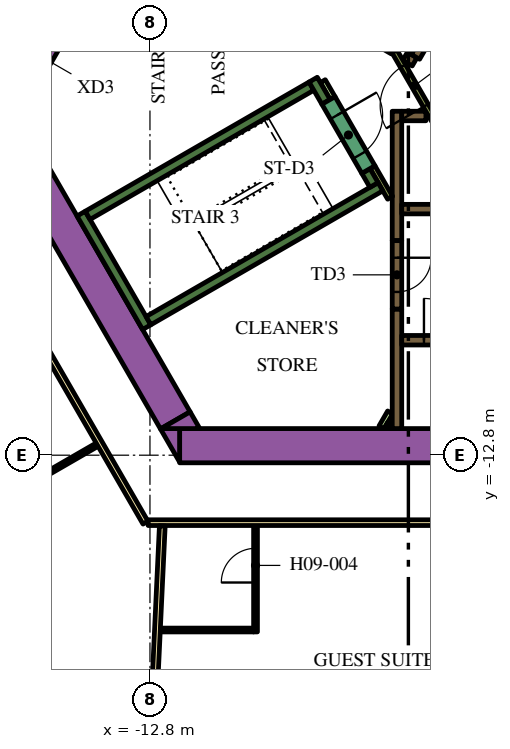
"""IFC4 building model, lengths in metres.
Left out: names, types, materials, properties, quantities, classifications, styles, units other than length and angle.
Written with IfcOpenShell. Run it as: python <this file> out.ifc"""

import sys

from ifc_helpers import new_model, si_unit, direction, frame, frame_2d, origin, place, context, subcontext, project, spatial, polyline, rectangle, outline, extrude, element, fill, save


model = new_model("IFC4")
c1 = context("Model", 3, precision=1e-05, world=origin(), true_north=direction((0.0, 1.0)))
c2 = subcontext(c1, "Body", "Model", "MODEL_VIEW")
j1 = project(units=[si_unit("LENGTHUNIT", "METRE"), si_unit("PLANEANGLEUNIT", "RADIAN")], contexts=[c1])
p1 = place(None, origin())
s1 = spatial("IfcSite", under=j1, at=p1, CompositionType="ELEMENT")
p2 = place(p1, origin())
s2 = spatial("IfcBuilding", under=s1, at=p2, CompositionType="ELEMENT")
p3 = place(p2, frame((0.0, 0.0, 122.7)))
s3 = spatial("IfcBuildingStorey", under=s2, at=p3, CompositionType="ELEMENT", Elevation=122.7)
p4 = place(p3, frame((-12.019, -12.55, 0.0), z_axis=(0.0, 0.0, 1.0), x_axis=(1.0, 0.0, 0.0)))
e1 = element("IfcWall", 1, at=p4, inside=s3, PredefinedType="SOLIDWALL", context=c2, shape_type="SweptSolid", body=[
    extrude(rectangle(XDim=22.083, YDim=0.9, at=frame_2d((11.042, 0.0))), origin(), (0.0, 0.0, 1.0), 3.9),
])
p5 = place(p3, origin())
e2 = element("IfcWall", 2, at=p5, inside=s3, PredefinedType="SOLIDWALL", context=c2, shape_type="SweptSolid", body=[
    extrude(outline(polyline([(-12.529, -12.1), (-12.021, -12.1), (-12.021, -12.98), (-12.529, -12.1)])), origin(), (0.0, 0.0, 1.0), 3.9),
])
p6 = place(p3, frame((-12.134, -11.883, 0.0), z_axis=(0.0, 0.0, 1.0), x_axis=(-0.500005339912, 0.866022320763, 0.0)))
e3 = element("IfcWall", 3, at=p6, inside=s3, PredefinedType="SOLIDWALL", context=c2, shape_type="SweptSolid", body=[
    extrude(rectangle(XDim=9.488, YDim=0.9, at=frame_2d((4.744, 0.0))), origin(), (0.0, 0.0, 1.0), 3.9),
])
e4 = element("IfcWall", 4, at=p5, inside=s3, PredefinedType="SOLIDWALL", context=c2, shape_type="SweptSolid", body=[
    extrude(outline(polyline([(-11.489, -12.1), (-12.505, -12.1), (-11.743, -11.66), (-11.489, -12.1)])), origin(), (0.0, 0.0, 1.0), 3.9),
])
p7 = place(p3, frame((-12.885, -9.431, 0.0), z_axis=(0.0, 0.0, 1.0), x_axis=(-0.500020560727, 0.866013532718, 0.0)))
e5 = element("IfcWall", 5, at=p7, inside=s3, PredefinedType="SOLIDWALL", context=c2, shape_type="SweptSolid", body=[
    extrude(rectangle(XDim=3.45, YDim=0.25, at=frame_2d((1.725, 0.0))), origin(), (0.0, 0.0, 1.0), 3.9),
])
p8 = place(p3, frame((-14.44, -6.49, 0.0), z_axis=(0.0, 0.0, 1.0), x_axis=(0.866022966069, 0.500004222222, 0.0)))
e6 = element("IfcWall", 6, at=p8, inside=s3, PredefinedType="SOLIDWALL", context=c2, shape_type="SweptSolid", body=[
    extrude(rectangle(XDim=6.8, YDim=0.25, at=frame_2d((3.4, 0.0))), origin(), (0.0, 0.0, 1.0), 3.9),
])
p9 = place(p3, frame((-8.168, -3.503, 0.0), z_axis=(0.0, 0.0, 1.0), x_axis=(-0.499952099219, 0.866053057547, 0.0)))
e7 = element("IfcWall", 7, at=p9, inside=s3, PredefinedType="SOLIDWALL", context=c2, shape_type="SweptSolid", body=[
    extrude(rectangle(XDim=0.675, YDim=0.25, at=frame_2d((0.337, 0.0))), origin(), (0.0, 0.0, 1.0), 3.9),
])
p10 = place(p3, frame((-12.84, -9.261, 0.0), z_axis=(0.0, 0.0, 1.0), x_axis=(0.866016039709, 0.500016218704, 0.0)))
e8 = element("IfcWall", 8, at=p10, inside=s3, PredefinedType="SOLIDWALL", context=c2, shape_type="SweptSolid", body=[
    extrude(rectangle(XDim=7.05, YDim=0.25, at=frame_2d((3.525, 0.0))), origin(), (0.0, 0.0, 1.0), 3.9),
])
p11 = place(p3, frame((-6.905, -5.69, 0.0), z_axis=(0.0, 0.0, 1.0), x_axis=(-0.500402024738, 0.865793170242, 0.0)))
e9 = element("IfcWall", 9, at=p11, inside=s3, PredefinedType="SOLIDWALL", context=c2, shape_type="SweptSolid", body=[
    extrude(rectangle(XDim=0.425, YDim=0.25, at=frame_2d((0.212, 0.0))), origin(), (0.0, 0.0, 1.0), 3.9),
])
p12 = place(p3, frame((-6.3, -12.1, 0.0), z_axis=(0.0, 0.0, 1.0), x_axis=(0.0, 1.0, 0.0)))
e10 = element("IfcWall", 10, at=p12, inside=s3, PredefinedType="SOLIDWALL", context=c2, shape_type="SweptSolid", body=[
    extrude(rectangle(XDim=3.146, YDim=0.25, at=frame_2d((1.573, 0.0))), origin(), (0.0, 0.0, 1.0), 3.9),
])
p13 = place(p3, frame((-6.3, -3.75, 0.0), z_axis=(0.0, 0.0, 1.0), x_axis=(0.0, -1.0, 0.0)))
e11 = element("IfcWall", 11, at=p13, inside=s3, PredefinedType="SOLIDWALL", context=c2, shape_type="SweptSolid", body=[
    extrude(rectangle(XDim=3.404, YDim=0.25, at=frame_2d((1.702, 0.0))), origin(), (0.0, 0.0, 1.0), 3.9),
])
p14 = place(p3, frame((-6.175, -3.875, 0.0), z_axis=(0.0, 0.0, 1.0), x_axis=(1.0, 0.0, 0.0)))
e12 = element("IfcWall", 12, at=p14, inside=s3, PredefinedType="SOLIDWALL", context=c2, shape_type="SweptSolid", body=[
    extrude(rectangle(XDim=0.637, YDim=0.25, at=frame_2d((0.318, 0.0))), origin(), (0.0, 0.0, 1.0), 3.9),
])
p15 = place(p3, frame((-6.088, -2.305, 0.0), z_axis=(0.0, 0.0, 1.0), x_axis=(0.866059450854, -0.499941024108, 0.0)))
e13 = element("IfcWall", 13, at=p15, inside=s3, PredefinedType="SOLIDWALL", context=c2, shape_type="SweptSolid", body=[
    extrude(rectangle(XDim=0.29, YDim=0.25, at=frame_2d((0.145, 0.0))), origin(), (0.0, 0.0, 1.0), 3.9),
])
p16 = place(p3, frame((-7.889, -1.265, 0.0), z_axis=(0.0, 0.0, 1.0), x_axis=(0.865986741702, -0.500066958712, 0.0)))
e14 = element("IfcWall", 14, at=p16, inside=s3, PredefinedType="SOLIDWALL", context=c2, shape_type="SweptSolid", body=[
    extrude(rectangle(XDim=1.738, YDim=0.25, at=frame_2d((0.869, 0.0))), origin(), (0.0, 0.0, 1.0), 3.9),
])
p17 = place(p3, frame((-6.708, -12.068, 0.0), z_axis=(0.0, 0.0, 1.0), x_axis=(0.500000789788, 0.8660249478, 0.0)))
e15 = element("IfcWall", 15, at=p17, inside=s3, PredefinedType="PARTITIONING", context=c2, shape_type="SweptSolid", body=[
    extrude(rectangle(XDim=0.456, YDim=0.15, at=frame_2d((0.228, 0.0))), origin(), (0.0, 0.0, 1.0), 2.75),
])
p18 = place(p3, frame((-6.534, -12.068, 0.0), z_axis=(0.0, 0.0, 1.0), x_axis=(0.500240224089, 0.865886665912, 0.0)))
e16 = element("IfcWall", 16, at=p18, inside=s3, PredefinedType="PARTITIONING", context=c2, shape_type="SweptSolid", body=[
    extrude(rectangle(XDim=0.109, YDim=0.15, at=frame_2d((0.054, 0.0))), origin(), (0.0, 0.0, 1.0), 2.75),
])
p19 = place(p3, frame((-6.48, -6.027, 0.0), z_axis=(0.0, 0.0, 1.0), x_axis=(-0.499927229454, 0.866067413802, 0.0)))
e17 = element("IfcWall", 17, at=p19, inside=s3, PredefinedType="PARTITIONING", context=c2, shape_type="SweptSolid", body=[
    extrude(rectangle(XDim=0.929, YDim=0.15, at=frame_2d((0.464, 0.0))), origin(), (0.0, 0.0, 1.0), 3.9),
])
p20 = place(p3, frame((-8.252, -2.958, 0.0), z_axis=(0.0, 0.0, 1.0), x_axis=(0.500174715838, -0.865924508047, 0.0)))
e18 = element("IfcWall", 18, at=p20, inside=s3, PredefinedType="PARTITIONING", context=c2, shape_type="SweptSolid", body=[
    extrude(rectangle(XDim=0.514, YDim=0.15, at=frame_2d((0.257, 0.0))), origin(), (0.0, 0.0, 1.0), 2.75),
])
p21 = place(p3, frame((-6.175, -9.775, 0.0), z_axis=(0.0, 0.0, 1.0), x_axis=(1.0, 0.0, 0.0)))
e19 = element("IfcWall", 19, at=p21, inside=s3, PredefinedType="SOLIDWALL", context=c2, shape_type="SweptSolid", body=[
    extrude(rectangle(XDim=12.35, YDim=0.25, at=frame_2d((6.175, 0.0))), origin(), (0.0, 0.0, 1.0), 3.9),
])
p22 = place(p21, frame((0.585, 0.0, 0.0)))
e20 = element("IfcOpeningElement", 20, at=p22, cuts=e19, PredefinedType="OPENING", context=c2, shape_type="SweptSolid", body=[
    extrude(rectangle(XDim=1.1, YDim=2.1, at=frame_2d((0.55, 1.05))), frame((0.0, 0.135, 0.0), z_axis=(0.0, -1.0, 0.0), x_axis=(1.0, 0.0, 0.0)), (0.0, 0.0, 1.0), 0.27),
])
p23 = place(p21, frame((3.105, 0.0, 0.0)))
e21 = element("IfcOpeningElement", 21, at=p23, cuts=e19, PredefinedType="OPENING", context=c2, shape_type="SweptSolid", body=[
    extrude(rectangle(XDim=1.1, YDim=2.1, at=frame_2d((0.55, 1.05))), frame((0.0, 0.135, 0.0), z_axis=(0.0, -1.0, 0.0), x_axis=(1.0, 0.0, 0.0)), (0.0, 0.0, 1.0), 0.27),
])
p24 = place(p21, frame((5.625, 0.0, 0.0)))
e22 = element("IfcOpeningElement", 22, at=p24, cuts=e19, PredefinedType="OPENING", context=c2, shape_type="SweptSolid", body=[
    extrude(rectangle(XDim=1.1, YDim=2.1, at=frame_2d((0.55, 1.05))), frame((0.0, 0.135, 0.0), z_axis=(0.0, -1.0, 0.0), x_axis=(1.0, 0.0, 0.0)), (0.0, 0.0, 1.0), 0.27),
])
p25 = place(p21, frame((8.145, 0.0, 0.0)))
e23 = element("IfcOpeningElement", 23, at=p25, cuts=e19, PredefinedType="OPENING", context=c2, shape_type="SweptSolid", body=[
    extrude(rectangle(XDim=1.1, YDim=2.1, at=frame_2d((0.55, 1.05))), frame((0.0, 0.135, 0.0), z_axis=(0.0, -1.0, 0.0), x_axis=(1.0, 0.0, 0.0)), (0.0, 0.0, 1.0), 0.27),
])
p26 = place(p21, frame((10.665, 0.0, 0.0)))
e24 = element("IfcOpeningElement", 24, at=p26, cuts=e19, PredefinedType="OPENING", context=c2, shape_type="SweptSolid", body=[
    extrude(rectangle(XDim=1.1, YDim=2.1, at=frame_2d((0.55, 1.05))), frame((0.0, 0.135, 0.0), z_axis=(0.0, -1.0, 0.0), x_axis=(1.0, 0.0, 0.0)), (0.0, 0.0, 1.0), 0.27),
])
p27 = place(p3, frame((-6.175, -6.325, 0.0), z_axis=(0.0, 0.0, 1.0), x_axis=(1.0, 0.0, 0.0)))
e25 = element("IfcWall", 25, at=p27, inside=s3, PredefinedType="SOLIDWALL", context=c2, shape_type="SweptSolid", body=[
    extrude(rectangle(XDim=12.35, YDim=0.25, at=frame_2d((6.175, 0.0))), origin(), (0.0, 0.0, 1.0), 3.9),
])
p28 = place(p27, frame((3.205, 0.0, 0.0)))
e26 = element("IfcOpeningElement", 26, at=p28, cuts=e25, PredefinedType="OPENING", context=c2, shape_type="SweptSolid", body=[
    extrude(rectangle(XDim=0.9, YDim=2.1, at=frame_2d((0.45, 1.05))), frame((0.0, 0.135, 0.0), z_axis=(0.0, -1.0, 0.0), x_axis=(1.0, 0.0, 0.0)), (0.0, 0.0, 1.0), 0.27),
])
p29 = place(p27, frame((8.145, 0.0, 0.0)))
e27 = element("IfcOpeningElement", 27, at=p29, cuts=e25, PredefinedType="OPENING", context=c2, shape_type="SweptSolid", body=[
    extrude(rectangle(XDim=1.1, YDim=2.1, at=frame_2d((0.55, 1.05))), frame((0.0, 0.135, 0.0), z_axis=(0.0, -1.0, 0.0), x_axis=(1.0, 0.0, 0.0)), (0.0, 0.0, 1.0), 0.27),
])
p30 = place(p27, frame((10.665, 0.0, 0.0)))
e28 = element("IfcOpeningElement", 28, at=p30, cuts=e25, PredefinedType="OPENING", context=c2, shape_type="SweptSolid", body=[
    extrude(rectangle(XDim=1.1, YDim=2.1, at=frame_2d((0.55, 1.05))), frame((0.0, 0.135, 0.0), z_axis=(0.0, -1.0, 0.0), x_axis=(1.0, 0.0, 0.0)), (0.0, 0.0, 1.0), 0.27),
])
p31 = place(p3, frame((-0.898, 6.194, 0.0), z_axis=(0.0, 0.0, 1.0), x_axis=(-0.499996202215, -0.866027596426, 0.0)))
e29 = element("IfcWall", 29, at=p31, inside=s3, PredefinedType="SOLIDWALL", context=c2, shape_type="SweptSolid", body=[
    extrude(rectangle(XDim=9.83, YDim=0.25, at=frame_2d((4.915, 0.0))), origin(), (0.0, 0.0, 1.0), 3.9),
])
p32 = place(p31, frame((0.585, 0.0, 0.0)))
e30 = element("IfcOpeningElement", 30, at=p32, cuts=e29, PredefinedType="OPENING", context=c2, shape_type="SweptSolid", body=[
    extrude(rectangle(XDim=1.1, YDim=2.1, at=frame_2d((0.55, 1.05))), frame((0.0, 0.135, 0.0), z_axis=(0.0, -1.0, 0.0), x_axis=(1.0, 0.0, 0.0)), (0.0, 0.0, 1.0), 0.27),
])
p33 = place(p31, frame((3.105, 0.0, 0.0)))
e31 = element("IfcOpeningElement", 31, at=p33, cuts=e29, PredefinedType="OPENING", context=c2, shape_type="SweptSolid", body=[
    extrude(rectangle(XDim=1.1, YDim=2.1, at=frame_2d((0.55, 1.05))), frame((0.0, 0.135, 0.0), z_axis=(0.0, -1.0, 0.0), x_axis=(1.0, 0.0, 0.0)), (0.0, 0.0, 1.0), 0.27),
])
p34 = place(p31, frame((5.625, 0.0, 0.0)))
e32 = element("IfcOpeningElement", 32, at=p34, cuts=e29, PredefinedType="OPENING", context=c2, shape_type="SweptSolid", body=[
    extrude(rectangle(XDim=1.1, YDim=2.1, at=frame_2d((0.55, 1.05))), frame((0.0, 0.135, 0.0), z_axis=(0.0, -1.0, 0.0), x_axis=(1.0, 0.0, 0.0)), (0.0, 0.0, 1.0), 0.27),
])
p35 = place(p31, frame((8.145, 0.0, 0.0)))
e33 = element("IfcOpeningElement", 33, at=p35, cuts=e29, PredefinedType="OPENING", context=c2, shape_type="SweptSolid", body=[
    extrude(rectangle(XDim=1.1, YDim=2.1, at=frame_2d((0.55, 1.05))), frame((0.0, 0.135, 0.0), z_axis=(0.0, -1.0, 0.0), x_axis=(1.0, 0.0, 0.0)), (0.0, 0.0, 1.0), 0.27),
])
p36 = place(p3, frame((-8.103, -3.466, 0.0), z_axis=(0.0, 0.0, 1.0), x_axis=(0.500078061341, -0.865980330357, 0.0)))
e34 = element("IfcWall", 34, at=p36, inside=s3, PredefinedType="SOLIDWALL", context=c2, shape_type="SweptSolid", body=[
    extrude(rectangle(XDim=2.1, YDim=0.4, at=frame_2d((1.05, 0.0))), origin(), (0.0, 0.0, 1.0), 3.9),
])
p37 = place(p36, frame((0.45, 0.0, 0.0)))
e35 = element("IfcOpeningElement", 35, at=p37, cuts=e34, PredefinedType="OPENING", context=c2, shape_type="SweptSolid", body=[
    extrude(rectangle(XDim=1.2, YDim=2.1, at=frame_2d((0.6, 1.05))), frame((0.0, 0.21, 0.0), z_axis=(0.0, -1.0, 0.0), x_axis=(1.0, 0.0, 0.0)), (0.0, 0.0, 1.0), 0.42),
])
p38 = place(p3, frame((-6.3, -7.154, 0.0), z_axis=(0.0, 0.0, 1.0), x_axis=(0.0, -1.0, 0.0)))
e36 = element("IfcWall", 36, at=p38, inside=s3, PredefinedType="SOLIDWALL", context=c2, shape_type="SweptSolid", body=[
    extrude(rectangle(XDim=1.8, YDim=0.25, at=frame_2d((0.9, 0.0))), origin(), (0.0, 0.0, 1.0), 3.9),
])
p39 = place(p38, frame((0.45, 0.0, 0.0)))
e37 = element("IfcOpeningElement", 37, at=p39, cuts=e36, PredefinedType="OPENING", context=c2, shape_type="SweptSolid", body=[
    extrude(rectangle(XDim=0.9, YDim=2.1, at=frame_2d((0.45, 1.05))), frame((0.0, 0.135, 0.0), z_axis=(0.0, -1.0, 0.0), x_axis=(1.0, 0.0, 0.0)), (0.0, 0.0, 1.0), 0.27),
])
p40 = place(p3, frame((-5.317, -3.99, 0.0), z_axis=(0.0, 0.0, 1.0), x_axis=(-0.500027713859, 0.866009402589, 0.0)))
e38 = element("IfcWall", 38, at=p40, inside=s3, PredefinedType="PARTITIONING", context=c2, shape_type="SweptSolid", body=[
    extrude(rectangle(XDim=2.1, YDim=0.15, at=frame_2d((1.05, 0.0))), origin(), (0.0, 0.0, 1.0), 3.9),
])
p41 = place(p40, frame((0.45, 0.0, 0.0)))
e39 = element("IfcOpeningElement", 39, at=p41, cuts=e38, PredefinedType="OPENING", context=c2, shape_type="SweptSolid", body=[
    extrude(rectangle(XDim=1.2, YDim=2.1, at=frame_2d((0.6, 1.05))), frame((0.0, 0.085, 0.0), z_axis=(0.0, -1.0, 0.0), x_axis=(1.0, 0.0, 0.0)), (0.0, 0.0, 1.0), 0.17),
])
p42 = place(p3, frame((-16.209, -2.976, 0.0), z_axis=(0.0, 0.0, 1.0), x_axis=(0.499954529098, 0.86605165483, 0.0)))
e40 = element("IfcWall", 40, at=p42, inside=s3, PredefinedType="SOLIDWALL", context=c2, shape_type="SweptSolid", body=[
    extrude(rectangle(XDim=1.7, YDim=0.9, at=frame_2d((0.85, 0.0))), origin(), (0.0, 0.0, 1.0), 3.9),
])
p43 = place(p42, frame((0.25, 0.0, 0.0)))
e41 = element("IfcOpeningElement", 41, at=p43, cuts=e40, PredefinedType="OPENING", context=c2, shape_type="SweptSolid", body=[
    extrude(rectangle(XDim=1.2, YDim=2.1, at=frame_2d((0.6, 1.05))), frame((0.0, 0.46, 0.0), z_axis=(0.0, -1.0, 0.0), x_axis=(1.0, 0.0, 0.0)), (0.0, 0.0, 1.0), 0.92),
])
p44 = place(p3, frame((-19.081, -3.9, 0.0), z_axis=(0.0, 0.0, 1.0), x_axis=(0.499998313975, 0.866026377209, 0.0)))
e42 = element("IfcWall", 42, at=p44, inside=s3, PredefinedType="PARTITIONING", context=c2, shape_type="SweptSolid", body=[
    extrude(rectangle(XDim=25.766, YDim=0.15, at=frame_2d((12.883, 0.0))), origin(), (0.0, 0.0, 1.0), 2.75),
])
p45 = place(p44, frame((19.306, 0.0, 0.0)))
e43 = element("IfcOpeningElement", 43, at=p45, cuts=e42, PredefinedType="OPENING", context=c2, shape_type="SweptSolid", body=[
    extrude(rectangle(XDim=1.0, YDim=2.1, at=frame_2d((0.5, 1.05))), frame((0.0, 0.085, 0.0), z_axis=(0.0, -1.0, 0.0), x_axis=(1.0, 0.0, 0.0)), (0.0, 0.0, 1.0), 0.17),
])
p46 = place(p44, frame((18.0, 0.0, 0.0)))
e44 = element("IfcOpeningElement", 44, at=p46, cuts=e42, PredefinedType="OPENING", context=c2, shape_type="SweptSolid", body=[
    extrude(rectangle(XDim=1.0, YDim=2.1, at=frame_2d((0.5, 1.05))), frame((0.0, 0.085, 0.0), z_axis=(0.0, -1.0, 0.0), x_axis=(1.0, 0.0, 0.0)), (0.0, 0.0, 1.0), 0.17),
])
p47 = place(p44, frame((7.793, 0.0, 0.0)))
e45 = element("IfcOpeningElement", 45, at=p47, cuts=e42, PredefinedType="OPENING", context=c2, shape_type="SweptSolid", body=[
    extrude(rectangle(XDim=0.9, YDim=2.1, at=frame_2d((0.45, 1.05))), frame((0.0, 0.085, 0.0), z_axis=(0.0, -1.0, 0.0), x_axis=(1.0, 0.0, 0.0)), (0.0, 0.0, 1.0), 0.17),
])
p48 = place(p44, frame((4.674, 0.0, 0.0)))
e46 = element("IfcOpeningElement", 46, at=p48, cuts=e42, PredefinedType="OPENING", context=c2, shape_type="SweptSolid", body=[
    extrude(rectangle(XDim=0.9, YDim=2.1, at=frame_2d((0.45, 1.05))), frame((0.0, 0.085, 0.0), z_axis=(0.0, -1.0, 0.0), x_axis=(1.0, 0.0, 0.0)), (0.0, 0.0, 1.0), 0.17),
])
p49 = place(p44, frame((0.18, 0.0, 0.0)))
e47 = element("IfcOpeningElement", 47, at=p49, cuts=e42, PredefinedType="OPENING", context=c2, shape_type="SweptSolid", body=[
    extrude(rectangle(XDim=1.0, YDim=2.1, at=frame_2d((0.5, 1.05))), frame((0.0, 0.085, 0.0), z_axis=(0.0, -1.0, 0.0), x_axis=(1.0, 0.0, 0.0)), (0.0, 0.0, 1.0), 0.17),
])
p50 = place(p3, frame((-12.918, -14.575, 0.0), z_axis=(0.0, 0.0, 1.0), x_axis=(-0.500009150678, 0.866020120573, 0.0)))
e48 = element("IfcWall", 48, at=p50, inside=s3, PredefinedType="PARTITIONING", context=c2, shape_type="SweptSolid", body=[
    extrude(rectangle(XDim=5.258, YDim=0.15, at=frame_2d((2.629, 0.0))), origin(), (0.0, 0.0, 1.0), 2.75),
])
p51 = place(p3, frame((12.918, -14.575, 0.0), z_axis=(0.0, 0.0, 1.0), x_axis=(-1.0, 0.0, 0.0)))
e49 = element("IfcWall", 49, at=p51, inside=s3, PredefinedType="PARTITIONING", context=c2, shape_type="SweptSolid", body=[
    extrude(rectangle(XDim=25.766, YDim=0.15, at=frame_2d((12.883, 0.0))), origin(), (0.0, 0.0, 1.0), 2.75),
])
p52 = place(p51, frame((16.189, 0.0, 0.0)))
e50 = element("IfcOpeningElement", 50, at=p52, cuts=e49, PredefinedType="OPENING", context=c2, shape_type="SweptSolid", body=[
    extrude(rectangle(XDim=1.0, YDim=2.1, at=frame_2d((0.5, 1.05))), frame((0.0, 0.085, 0.0), z_axis=(0.0, -1.0, 0.0), x_axis=(1.0, 0.0, 0.0)), (0.0, 0.0, 1.0), 0.17),
])
p53 = place(p51, frame((14.882, 0.0, 0.0)))
e51 = element("IfcOpeningElement", 51, at=p53, cuts=e49, PredefinedType="OPENING", context=c2, shape_type="SweptSolid", body=[
    extrude(rectangle(XDim=1.0, YDim=2.1, at=frame_2d((0.5, 1.05))), frame((0.0, 0.085, 0.0), z_axis=(0.0, -1.0, 0.0), x_axis=(1.0, 0.0, 0.0)), (0.0, 0.0, 1.0), 0.17),
])
p54 = place(p51, frame((0.596, 0.0, 0.0)))
e52 = element("IfcOpeningElement", 52, at=p54, cuts=e49, PredefinedType="OPENING", context=c2, shape_type="SweptSolid", body=[
    extrude(rectangle(XDim=1.1, YDim=2.1, at=frame_2d((0.55, 1.05))), frame((0.0, 0.085, 0.0), z_axis=(0.0, -1.0, 0.0), x_axis=(1.0, 0.0, 0.0)), (0.0, 0.0, 1.0), 0.17),
])
p55 = place(p3, frame((-12.774, -21.045, 0.0), z_axis=(0.0, 0.0, 1.0), x_axis=(0.046750341626, 0.998906605023, 0.0)))
e53 = element("IfcWall", 53, at=p55, inside=s3, PredefinedType="PARTITIONING", context=c2, shape_type="SweptSolid", body=[
    extrude(rectangle(XDim=6.392, YDim=0.15, at=frame_2d((3.196, 0.0))), origin(), (0.0, 0.0, 1.0), 2.75),
])
p56 = place(p3, frame((-16.442, -13.823, 0.0), z_axis=(0.0, 0.0, 1.0), x_axis=(0.866021400173, 0.500006934395, 0.0)))
e54 = element("IfcWall", 54, at=p56, inside=s3, PredefinedType="PARTITIONING", context=c2, shape_type="SweptSolid", body=[
    extrude(rectangle(XDim=2.6, YDim=0.1, at=frame_2d((1.3, 0.0))), origin(), (0.0, 0.0, 1.0), 2.75),
])
p57 = place(p3, frame((-10.022, -17.45, 0.0), z_axis=(0.0, 0.0, 1.0), x_axis=(0.0, 1.0, 0.0)))
e55 = element("IfcWall", 55, at=p57, inside=s3, PredefinedType="PARTITIONING", context=c2, shape_type="SweptSolid", body=[
    extrude(rectangle(XDim=2.8, YDim=0.1, at=frame_2d((1.4, 0.0))), origin(), (0.0, 0.0, 1.0), 2.75),
])
p58 = place(p57, frame((1.3, 0.0, 0.0)))
e56 = element("IfcOpeningElement", 56, at=p58, cuts=e55, PredefinedType="OPENING", context=c2, shape_type="SweptSolid", body=[
    extrude(rectangle(XDim=0.9, YDim=2.1, at=frame_2d((0.45, 1.05))), frame((0.0, 0.06, 0.0), z_axis=(0.0, -1.0, 0.0), x_axis=(1.0, 0.0, 0.0)), (0.0, 0.0, 1.0), 0.12),
])
p59 = place(p3, frame((-10.072, -17.4, 0.0), z_axis=(0.0, 0.0, 1.0), x_axis=(-1.0, 0.0, 0.0)))
e57 = element("IfcWall", 57, at=p59, inside=s3, PredefinedType="PARTITIONING", context=c2, shape_type="SweptSolid", body=[
    extrude(rectangle(XDim=2.45, YDim=0.1, at=frame_2d((1.225, 0.0))), origin(), (0.0, 0.0, 1.0), 2.75),
])
p60 = place(p22, origin())
e58 = element("IfcDoor", 58, at=p60, inside=s3, OperationType="DOUBLE_DOOR_SLIDING", PredefinedType="DOOR", context=c2, shape_type="SweptSolid", body=[
    extrude(rectangle(XDim=1.1, YDim=2.1, at=frame_2d((0.55, 1.05))), frame((0.0, 0.025, 0.0), z_axis=(0.0, -1.0, 0.0), x_axis=(1.0, 0.0, 0.0)), (0.0, 0.0, 1.0), 0.05),
])
fill(e20, e58)
p61 = place(p37, origin())
e59 = element("IfcDoor", 59, at=p61, inside=s3, OperationType="SINGLE_SWING_LEFT", PredefinedType="DOOR", context=c2, shape_type="SweptSolid", body=[
    extrude(rectangle(XDim=1.2, YDim=2.1, at=frame_2d((0.6, 1.05))), frame((0.0, 0.025, 0.0), z_axis=(0.0, -1.0, 0.0), x_axis=(1.0, 0.0, 0.0)), (0.0, 0.0, 1.0), 0.05),
])
fill(e35, e59)
p62 = place(p39, origin())
e60 = element("IfcDoor", 60, at=p62, inside=s3, OperationType="SINGLE_SWING_LEFT", PredefinedType="DOOR", context=c2, shape_type="SweptSolid", body=[
    extrude(rectangle(XDim=0.9, YDim=2.1, at=frame_2d((0.45, 1.05))), frame((0.0, 0.025, 0.0), z_axis=(0.0, -1.0, 0.0), x_axis=(1.0, 0.0, 0.0)), (0.0, 0.0, 1.0), 0.05),
])
fill(e37, e60)
p63 = place(p41, origin())
e61 = element("IfcDoor", 61, at=p63, inside=s3, OperationType="SINGLE_SWING_LEFT", PredefinedType="DOOR", context=c2, shape_type="SweptSolid", body=[
    extrude(rectangle(XDim=1.2, YDim=2.1, at=frame_2d((0.6, 1.05))), frame((0.0, 0.025, 0.0), z_axis=(0.0, -1.0, 0.0), x_axis=(1.0, 0.0, 0.0)), (0.0, 0.0, 1.0), 0.05),
])
fill(e39, e61)
p64 = place(p58, origin())
e62 = element("IfcDoor", 62, at=p64, inside=s3, OperationType="SINGLE_SWING_LEFT", PredefinedType="DOOR", context=c2, shape_type="SweptSolid", body=[
    extrude(rectangle(XDim=0.9, YDim=2.1, at=frame_2d((0.45, 1.05))), frame((0.0, 0.025, 0.0), z_axis=(0.0, -1.0, 0.0), x_axis=(1.0, 0.0, 0.0)), (0.0, 0.0, 1.0), 0.05),
])
fill(e56, e62)
save(model, sys.argv[1])
